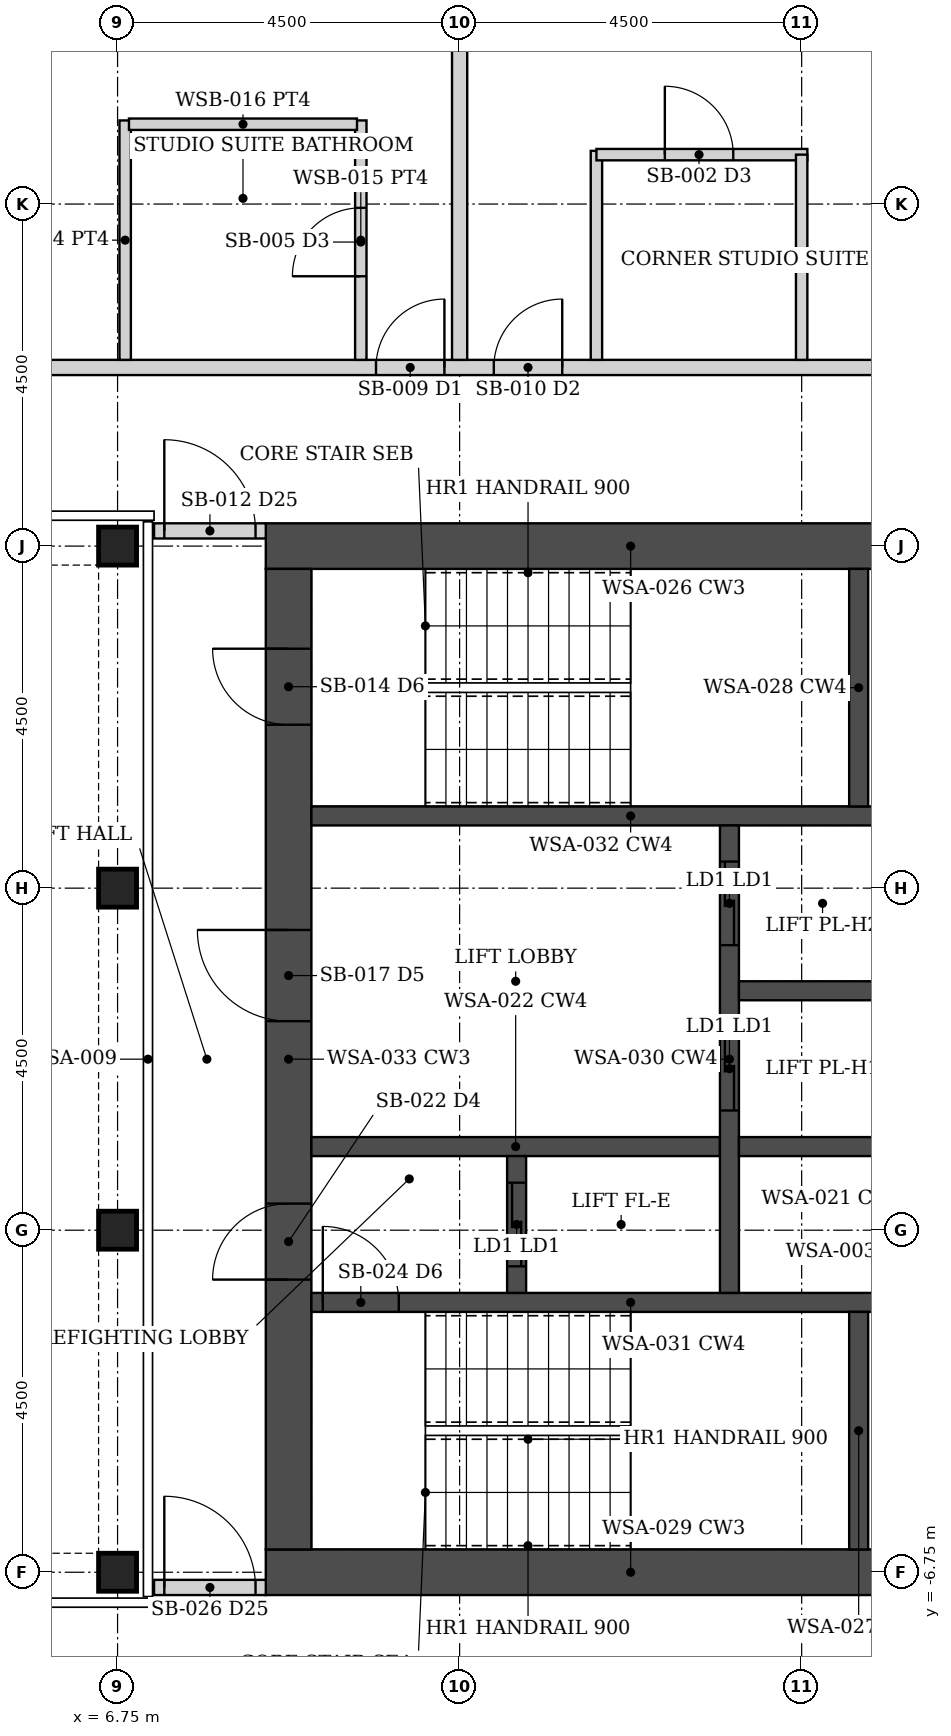
"""IFC4 building model, lengths in metres.
Left out: names, types, materials, properties, quantities, classifications, styles, units other than length and angle.
Written with IfcOpenShell. Run it as: python <this file> out.ifc"""

import sys

from ifc_helpers import new_model, si_unit, direction, frame, frame_2d, origin, origin_2d, place, context, subcontext, project, spatial, rectangle, hollow_rectangle, extrude, element, fill, save


model = new_model("IFC4")
c1 = context("Model", 3, precision=1e-05, world=origin(), true_north=direction((0.0, 1.0)))
c2 = subcontext(c1, "Body", "Model", "MODEL_VIEW")
j1 = project(units=[si_unit("LENGTHUNIT", "METRE"), si_unit("PLANEANGLEUNIT", "RADIAN")], contexts=[c1])
p1 = place(None, origin())
s1 = spatial("IfcSite", under=j1, at=p1, CompositionType="ELEMENT")
p2 = place(p1, origin())
s2 = spatial("IfcBuilding", under=s1, at=p2, CompositionType="ELEMENT")
p3 = place(p2, frame((0.0, 0.0, 212.05)))
s3 = spatial("IfcBuildingStorey", under=s2, at=p3, CompositionType="ELEMENT", Elevation=212.05)
for number, where, z_axis, x_axis in (
    (1, (6.75, -6.75, 0.0), (0.0, 0.0, 1.0), (1.0, 0.0, 0.0)),
    (2, (6.75, -2.25, 0.0), (0.0, 0.0, 1.0), (1.0, 0.0, 0.0)),
    (3, (6.75, 2.25, 0.0), (0.0, 0.0, 1.0), (1.0, 0.0, 0.0)),
    (4, (6.75, 6.75, 0.0), (0.0, 0.0, 1.0), (1.0, 0.0, 0.0)),
):
    element("IfcColumn", number, at=place(p3, frame(where, z_axis=z_axis, x_axis=x_axis)), inside=s3, PredefinedType="COLUMN", context=c2, shape_type="SweptSolid", body=[
        extrude(hollow_rectangle(XDim=0.5, YDim=0.5, WallThickness=0.03, at=origin_2d()), origin(), (0.0, 0.0, 1.0), 3.75),
    ])
for number, where, z_axis, x_axis in (
    (5, (8.7, -6.75, 0.0), (0.0, 0.0, 1.0), (1.0, 0.0, 0.0)),
    (6, (8.7, 6.75, 0.0), (0.0, 0.0, 1.0), (1.0, 0.0, 0.0)),
):
    element("IfcWall", number, at=place(p3, frame(where, z_axis=z_axis, x_axis=x_axis)), inside=s3, PredefinedType="SHEAR", context=c2, shape_type="SweptSolid", body=[
        extrude(rectangle(XDim=9.6, YDim=0.6, at=frame_2d((4.8, 0.0))), origin(), (0.0, 0.0, 1.0), 3.75),
    ])
p4 = place(p3, frame((9.0, -6.45, 0.0), z_axis=(0.0, 0.0, 1.0), x_axis=(0.0, 1.0, 0.0)))
e7 = element("IfcWall", 7, at=p4, inside=s3, PredefinedType="SHEAR", context=c2, shape_type="SweptSolid", body=[
    extrude(rectangle(XDim=12.9, YDim=0.6, at=frame_2d((6.45, 0.0))), origin(), (0.0, 0.0, 1.0), 3.75),
])
p5 = place(p4, frame((3.55, 0.0, 0.0)))
e8 = element("IfcOpeningElement", 8, at=p5, cuts=e7, PredefinedType="OPENING", context=c2, shape_type="SweptSolid", body=[
    extrude(rectangle(XDim=1.0, YDim=2.1, at=frame_2d((0.5, 1.05))), frame((0.0, 0.31, 0.0), z_axis=(0.0, -1.0, 0.0), x_axis=(1.0, 0.0, 0.0)), (0.0, 0.0, 1.0), 0.62),
])
p6 = place(p4, frame((6.95, 0.0, 0.0)))
e9 = element("IfcOpeningElement", 9, at=p6, cuts=e7, PredefinedType="OPENING", context=c2, shape_type="SweptSolid", body=[
    extrude(rectangle(XDim=1.2, YDim=2.1, at=frame_2d((0.6, 1.05))), frame((0.0, 0.31, 0.0), z_axis=(0.0, -1.0, 0.0), x_axis=(1.0, 0.0, 0.0)), (0.0, 0.0, 1.0), 0.62),
])
p7 = place(p4, frame((10.85, 0.0, 0.0)))
e10 = element("IfcOpeningElement", 10, at=p7, cuts=e7, PredefinedType="OPENING", context=c2, shape_type="SweptSolid", body=[
    extrude(rectangle(XDim=1.0, YDim=2.1, at=frame_2d((0.5, 1.05))), frame((0.0, 0.31, 0.0), z_axis=(0.0, -1.0, 0.0), x_axis=(1.0, 0.0, 0.0)), (0.0, 0.0, 1.0), 0.62),
])
p8 = place(p3, frame((9.3, -3.2, 0.0), z_axis=(0.0, 0.0, 1.0), x_axis=(1.0, 0.0, 0.0)))
e11 = element("IfcWall", 11, at=p8, inside=s3, PredefinedType="SHEAR", context=c2, shape_type="SweptSolid", body=[
    extrude(rectangle(XDim=8.4, YDim=0.25, at=frame_2d((4.2, 0.0))), origin(), (0.0, 0.0, 1.0), 3.75),
])
p9 = place(p8, frame((0.15, 0.0, 0.0)))
e12 = element("IfcOpeningElement", 12, at=p9, cuts=e11, PredefinedType="OPENING", context=c2, shape_type="SweptSolid", body=[
    extrude(rectangle(XDim=1.0, YDim=2.1, at=frame_2d((0.5, 1.05))), frame((0.0, 0.135, 0.0), z_axis=(0.0, -1.0, 0.0), x_axis=(1.0, 0.0, 0.0)), (0.0, 0.0, 1.0), 0.27),
])
p10 = place(p3, frame((9.3, 3.2, 0.0), z_axis=(0.0, 0.0, 1.0), x_axis=(1.0, 0.0, 0.0)))
e13 = element("IfcWall", 13, at=p10, inside=s3, PredefinedType="SHEAR", context=c2, shape_type="SweptSolid", body=[
    extrude(rectangle(XDim=8.4, YDim=0.25, at=frame_2d((4.2, 0.0))), origin(), (0.0, 0.0, 1.0), 3.75),
])
for number, where, z_axis, x_axis in (
    (14, (16.5, -6.45, 0.0), (0.0, 0.0, 1.0), (0.0, 1.0, 0.0)),
    (15, (16.5, 3.325, 0.0), (0.0, 0.0, 1.0), (0.0, 1.0, 0.0)),
):
    element("IfcWall", number, at=place(p3, frame(where, z_axis=z_axis, x_axis=x_axis)), inside=s3, PredefinedType="SHEAR", context=c2, shape_type="SweptSolid", body=[
        extrude(rectangle(XDim=3.125, YDim=0.25, at=frame_2d((1.562, 0.0))), origin(), (0.0, 0.0, 1.0), 3.75),
    ])
p11 = place(p3, frame((9.3, -1.15, 0.0), z_axis=(0.0, 0.0, 1.0), x_axis=(1.0, 0.0, 0.0)))
e16 = element("IfcWall", 16, at=p11, inside=s3, PredefinedType="SHEAR", context=c2, shape_type="SweptSolid", body=[
    extrude(rectangle(XDim=5.375, YDim=0.25, at=frame_2d((2.688, 0.0))), origin(), (0.0, 0.0, 1.0), 3.75),
])
p12 = place(p3, frame((12.0, -3.075, 0.0), z_axis=(0.0, 0.0, 1.0), x_axis=(0.0, 1.0, 0.0)))
e17 = element("IfcWall", 17, at=p12, inside=s3, PredefinedType="SHEAR", context=c2, shape_type="SweptSolid", body=[
    extrude(rectangle(XDim=1.8, YDim=0.25, at=frame_2d((0.9, 0.0))), origin(), (0.0, 0.0, 1.0), 3.75),
])
p13 = place(p12, frame((0.35, 0.0, 0.0)))
e18 = element("IfcOpeningElement", 18, at=p13, cuts=e17, PredefinedType="OPENING", context=c2, shape_type="SweptSolid", body=[
    extrude(rectangle(XDim=1.1, YDim=2.1, at=frame_2d((0.55, 1.05))), frame((0.0, 0.135, 0.0), z_axis=(0.0, -1.0, 0.0), x_axis=(1.0, 0.0, 0.0)), (0.0, 0.0, 1.0), 0.27),
])
p14 = place(p3, frame((14.8, -3.075, 0.0), z_axis=(0.0, 0.0, 1.0), x_axis=(0.0, 1.0, 0.0)))
e19 = element("IfcWall", 19, at=p14, inside=s3, PredefinedType="SHEAR", context=c2, shape_type="SweptSolid", body=[
    extrude(rectangle(XDim=6.15, YDim=0.25, at=frame_2d((3.075, 0.0))), origin(), (0.0, 0.0, 1.0), 3.75),
])
p15 = place(p14, frame((2.4, 0.0, 0.0)))
e20 = element("IfcOpeningElement", 20, at=p15, cuts=e19, PredefinedType="OPENING", context=c2, shape_type="SweptSolid", body=[
    extrude(rectangle(XDim=1.1, YDim=2.1, at=frame_2d((0.55, 1.05))), frame((0.0, 0.135, 0.0), z_axis=(0.0, -1.0, 0.0), x_axis=(1.0, 0.0, 0.0)), (0.0, 0.0, 1.0), 0.27),
])
p16 = place(p14, frame((4.575, 0.0, 0.0)))
e21 = element("IfcOpeningElement", 21, at=p16, cuts=e19, PredefinedType="OPENING", context=c2, shape_type="SweptSolid", body=[
    extrude(rectangle(XDim=1.1, YDim=2.1, at=frame_2d((0.55, 1.05))), frame((0.0, 0.135, 0.0), z_axis=(0.0, -1.0, 0.0), x_axis=(1.0, 0.0, 0.0)), (0.0, 0.0, 1.0), 0.27),
])
for number, where, z_axis, x_axis in (
    (22, (14.925, -1.15, 0.0), (0.0, 0.0, 1.0), (1.0, 0.0, 0.0)),
    (23, (14.925, 0.9, 0.0), (0.0, 0.0, 1.0), (1.0, 0.0, 0.0)),
):
    element("IfcWall", number, at=place(p3, frame(where, z_axis=z_axis, x_axis=x_axis)), inside=s3, PredefinedType="SHEAR", context=c2, shape_type="SweptSolid", body=[
        extrude(rectangle(XDim=2.775, YDim=0.25, at=frame_2d((1.387, 0.0))), origin(), (0.0, 0.0, 1.0), 3.75),
    ])
p17 = place(p3, frame((7.23, 6.95, 0.0), z_axis=(0.0, 0.0, 1.0), x_axis=(1.0, 0.0, 0.0)))
e24 = element("IfcWall", 24, at=p17, inside=s3, PredefinedType="PARTITIONING", context=c2, shape_type="SweptSolid", body=[
    extrude(rectangle(XDim=1.47, YDim=0.2, at=frame_2d((0.735, 0.0))), origin(), (0.0, 0.0, 1.0), 2.629),
])
p18 = place(p17, frame((0.135, 0.0, 0.0)))
e25 = element("IfcOpeningElement", 25, at=p18, cuts=e24, PredefinedType="OPENING", context=c2, shape_type="SweptSolid", body=[
    extrude(rectangle(XDim=1.2, YDim=2.1, at=frame_2d((0.6, 1.05))), frame((0.0, 0.11, 0.0), z_axis=(0.0, -1.0, 0.0), x_axis=(1.0, 0.0, 0.0)), (0.0, 0.0, 1.0), 0.22),
])
p19 = place(p3, frame((7.23, -6.95, 0.0), z_axis=(0.0, 0.0, 1.0), x_axis=(1.0, 0.0, 0.0)))
e26 = element("IfcWall", 26, at=p19, inside=s3, PredefinedType="PARTITIONING", context=c2, shape_type="SweptSolid", body=[
    extrude(rectangle(XDim=1.47, YDim=0.2, at=frame_2d((0.735, 0.0))), origin(), (0.0, 0.0, 1.0), 2.629),
])
p20 = place(p19, frame((0.135, 0.0, 0.0)))
e27 = element("IfcOpeningElement", 27, at=p20, cuts=e26, PredefinedType="OPENING", context=c2, shape_type="SweptSolid", body=[
    extrude(rectangle(XDim=1.2, YDim=2.1, at=frame_2d((0.6, 1.05))), frame((0.0, 0.11, 0.0), z_axis=(0.0, -1.0, 0.0), x_axis=(1.0, 0.0, 0.0)), (0.0, 0.0, 1.0), 0.22),
])
p21 = place(p3, frame((-20.05, 9.1, 0.0), z_axis=(0.0, 0.0, 1.0), x_axis=(1.0, 0.0, 0.0)))
e28 = element("IfcWall", 28, at=p21, inside=s3, PredefinedType="PARTITIONING", context=c2, shape_type="SweptSolid", body=[
    extrude(rectangle(XDim=40.1, YDim=0.2, at=frame_2d((20.05, 0.0))), origin(), (0.0, 0.0, 1.0), 2.629),
])
p22 = place(p21, frame((9.0, 0.0, 0.0)))
e29 = element("IfcOpeningElement", 29, at=p22, cuts=e28, PredefinedType="OPENING", context=c2, shape_type="SweptSolid", body=[
    extrude(rectangle(XDim=0.9, YDim=2.1, at=frame_2d((0.45, 1.05))), frame((0.0, 0.11, 0.0), z_axis=(0.0, -1.0, 0.0), x_axis=(1.0, 0.0, 0.0)), (0.0, 0.0, 1.0), 0.22),
])
p23 = place(p21, frame((18.0, 0.0, 0.0)))
e30 = element("IfcOpeningElement", 30, at=p23, cuts=e28, PredefinedType="OPENING", context=c2, shape_type="SweptSolid", body=[
    extrude(rectangle(XDim=0.9, YDim=2.1, at=frame_2d((0.45, 1.05))), frame((0.0, 0.11, 0.0), z_axis=(0.0, -1.0, 0.0), x_axis=(1.0, 0.0, 0.0)), (0.0, 0.0, 1.0), 0.22),
])
p24 = place(p21, frame((30.2, 0.0, 0.0)))
e31 = element("IfcOpeningElement", 31, at=p24, cuts=e28, PredefinedType="OPENING", context=c2, shape_type="SweptSolid", body=[
    extrude(rectangle(XDim=0.9, YDim=2.1, at=frame_2d((0.45, 1.05))), frame((0.0, 0.11, 0.0), z_axis=(0.0, -1.0, 0.0), x_axis=(1.0, 0.0, 0.0)), (0.0, 0.0, 1.0), 0.22),
])
p25 = place(p21, frame((31.75, 0.0, 0.0)))
e32 = element("IfcOpeningElement", 32, at=p25, cuts=e28, PredefinedType="OPENING", context=c2, shape_type="SweptSolid", body=[
    extrude(rectangle(XDim=0.9, YDim=2.1, at=frame_2d((0.45, 1.05))), frame((0.0, 0.11, 0.0), z_axis=(0.0, -1.0, 0.0), x_axis=(1.0, 0.0, 0.0)), (0.0, 0.0, 1.0), 0.22),
])
p26 = place(p21, frame((7.45, 0.0, 0.0)))
e33 = element("IfcOpeningElement", 33, at=p26, cuts=e28, PredefinedType="OPENING", context=c2, shape_type="SweptSolid", body=[
    extrude(rectangle(XDim=0.9, YDim=2.1, at=frame_2d((0.45, 1.05))), frame((0.0, 0.11, 0.0), z_axis=(0.0, -1.0, 0.0), x_axis=(1.0, 0.0, 0.0)), (0.0, 0.0, 1.0), 0.22),
])
p27 = place(p3, frame((9.95, 9.2, 0.0), z_axis=(0.0, 0.0, 1.0), x_axis=(0.0, 1.0, 0.0)))
e34 = element("IfcWall", 34, at=p27, inside=s3, PredefinedType="PARTITIONING", context=c2, shape_type="SweptSolid", body=[
    extrude(rectangle(XDim=3.15, YDim=0.15, at=frame_2d((1.575, 0.0))), origin(), (0.0, 0.0, 1.0), 2.629),
])
p28 = place(p27, frame((1.1, 0.0, 0.0)))
e35 = element("IfcOpeningElement", 35, at=p28, cuts=e34, PredefinedType="OPENING", context=c2, shape_type="SweptSolid", body=[
    extrude(rectangle(XDim=0.9, YDim=2.1, at=frame_2d((0.45, 1.05))), frame((0.0, 0.085, 0.0), z_axis=(0.0, -1.0, 0.0), x_axis=(1.0, 0.0, 0.0)), (0.0, 0.0, 1.0), 0.17),
])
p29 = place(p3, frame((6.85, 9.2, 0.0), z_axis=(0.0, 0.0, 1.0), x_axis=(0.0, 1.0, 0.0)))
e36 = element("IfcWall", 36, at=p29, inside=s3, PredefinedType="PARTITIONING", context=c2, shape_type="SweptSolid", body=[
    extrude(rectangle(XDim=3.15, YDim=0.15, at=frame_2d((1.575, 0.0))), origin(), (0.0, 0.0, 1.0), 2.629),
])
p30 = place(p3, frame((6.9, 12.3, 0.0), z_axis=(0.0, 0.0, 1.0), x_axis=(1.0, 0.0, 0.0)))
e37 = element("IfcWall", 37, at=p30, inside=s3, PredefinedType="PARTITIONING", context=c2, shape_type="SweptSolid", body=[
    extrude(rectangle(XDim=3.0, YDim=0.15, at=frame_2d((1.5, 0.0))), origin(), (0.0, 0.0, 1.0), 2.629),
])
p31 = place(p3, frame((11.25, 9.2, 0.0), z_axis=(0.0, 0.0, 1.0), x_axis=(0.0, 1.0, 0.0)))
e38 = element("IfcWall", 38, at=p31, inside=s3, PredefinedType="PARTITIONING", context=c2, shape_type="SweptSolid", body=[
    extrude(rectangle(XDim=10.7, YDim=0.2, at=frame_2d((5.35, 0.0))), origin(), (0.0, 0.0, 1.0), 2.629),
])
p32 = place(p3, frame((13.05, 9.2, 0.0), z_axis=(0.0, 0.0, 1.0), x_axis=(0.0, 1.0, 0.0)))
e39 = element("IfcWall", 39, at=p32, inside=s3, PredefinedType="PARTITIONING", context=c2, shape_type="SweptSolid", body=[
    extrude(rectangle(XDim=2.75, YDim=0.15, at=frame_2d((1.375, 0.0))), origin(), (0.0, 0.0, 1.0), 2.629),
])
p33 = place(p3, frame((13.05, 11.9, 0.0), z_axis=(0.0, 0.0, 1.0), x_axis=(1.0, 0.0, 0.0)))
e40 = element("IfcWall", 40, at=p33, inside=s3, PredefinedType="PARTITIONING", context=c2, shape_type="SweptSolid", body=[
    extrude(rectangle(XDim=2.775, YDim=0.15, at=frame_2d((1.387, 0.0))), origin(), (0.0, 0.0, 1.0), 2.629),
])
p34 = place(p33, frame((0.9, 0.0, 0.0)))
e41 = element("IfcOpeningElement", 41, at=p34, cuts=e40, PredefinedType="OPENING", context=c2, shape_type="SweptSolid", body=[
    extrude(rectangle(XDim=0.9, YDim=2.1, at=frame_2d((0.45, 1.05))), frame((0.0, 0.085, 0.0), z_axis=(0.0, -1.0, 0.0), x_axis=(1.0, 0.0, 0.0)), (0.0, 0.0, 1.0), 0.17),
])
p35 = place(p3, frame((15.75, 9.2, 0.0), z_axis=(0.0, 0.0, 1.0), x_axis=(0.0, 1.0, 0.0)))
e42 = element("IfcWall", 42, at=p35, inside=s3, PredefinedType="PARTITIONING", context=c2, shape_type="SweptSolid", body=[
    extrude(rectangle(XDim=2.7, YDim=0.15, at=frame_2d((1.35, 0.0))), origin(), (0.0, 0.0, 1.0), 2.629),
])
p36 = place(p18, origin())
e43 = element("IfcDoor", 43, at=p36, inside=s3, OperationType="DOUBLE_DOOR_DOUBLE_SWING", PredefinedType="DOOR", context=c2, shape_type="SweptSolid", body=[
    extrude(rectangle(XDim=1.2, YDim=2.1, at=frame_2d((0.6, 1.05))), frame((0.0, 0.025, 0.0), z_axis=(0.0, -1.0, 0.0), x_axis=(1.0, 0.0, 0.0)), (0.0, 0.0, 1.0), 0.05),
])
fill(e25, e43)
p37 = place(p20, origin())
e44 = element("IfcDoor", 44, at=p37, inside=s3, OperationType="DOUBLE_DOOR_DOUBLE_SWING", PredefinedType="DOOR", context=c2, shape_type="SweptSolid", body=[
    extrude(rectangle(XDim=1.2, YDim=2.1, at=frame_2d((0.6, 1.05))), frame((0.0, 0.025, 0.0), z_axis=(0.0, -1.0, 0.0), x_axis=(1.0, 0.0, 0.0)), (0.0, 0.0, 1.0), 0.05),
])
fill(e27, e44)
p38 = place(p24, origin())
e45 = element("IfcDoor", 45, at=p38, inside=s3, OperationType="SINGLE_SWING_RIGHT", PredefinedType="DOOR", context=c2, shape_type="SweptSolid", body=[
    extrude(rectangle(XDim=0.9, YDim=2.1, at=frame_2d((0.45, 1.05))), frame((0.0, 0.025, 0.0), z_axis=(0.0, -1.0, 0.0), x_axis=(1.0, 0.0, 0.0)), (0.0, 0.0, 1.0), 0.05),
])
fill(e31, e45)
p39 = place(p28, origin())
e46 = element("IfcDoor", 46, at=p39, inside=s3, OperationType="SINGLE_SWING_LEFT", PredefinedType="DOOR", context=c2, shape_type="SweptSolid", body=[
    extrude(rectangle(XDim=0.9, YDim=2.1, at=frame_2d((0.45, 1.05))), frame((0.0, 0.025, 0.0), z_axis=(0.0, -1.0, 0.0), x_axis=(1.0, 0.0, 0.0)), (0.0, 0.0, 1.0), 0.05),
])
fill(e35, e46)
p40 = place(p25, origin())
e47 = element("IfcDoor", 47, at=p40, inside=s3, OperationType="SINGLE_SWING_RIGHT", PredefinedType="DOOR", context=c2, shape_type="SweptSolid", body=[
    extrude(rectangle(XDim=0.9, YDim=2.1, at=frame_2d((0.45, 1.05))), frame((0.0, 0.025, 0.0), z_axis=(0.0, -1.0, 0.0), x_axis=(1.0, 0.0, 0.0)), (0.0, 0.0, 1.0), 0.05),
])
fill(e32, e47)
p41 = place(p34, origin())
e48 = element("IfcDoor", 48, at=p41, inside=s3, OperationType="SINGLE_SWING_LEFT", PredefinedType="DOOR", context=c2, shape_type="SweptSolid", body=[
    extrude(rectangle(XDim=0.9, YDim=2.1, at=frame_2d((0.45, 1.05))), frame((0.0, 0.025, 0.0), z_axis=(0.0, -1.0, 0.0), x_axis=(1.0, 0.0, 0.0)), (0.0, 0.0, 1.0), 0.05),
])
fill(e41, e48)
p42 = place(p5, origin())
e49 = element("IfcDoor", 49, at=p42, inside=s3, OperationType="SINGLE_SWING_LEFT", PredefinedType="DOOR", context=c2, shape_type="SweptSolid", body=[
    extrude(rectangle(XDim=1.0, YDim=2.1, at=frame_2d((0.5, 1.05))), frame((0.0, 0.025, 0.0), z_axis=(0.0, -1.0, 0.0), x_axis=(1.0, 0.0, 0.0)), (0.0, 0.0, 1.0), 0.05),
])
fill(e8, e49)
p43 = place(p9, origin())
e50 = element("IfcDoor", 50, at=p43, inside=s3, OperationType="SINGLE_SWING_LEFT", PredefinedType="DOOR", context=c2, shape_type="SweptSolid", body=[
    extrude(rectangle(XDim=1.0, YDim=2.1, at=frame_2d((0.5, 1.05))), frame((0.0, 0.025, 0.0), z_axis=(0.0, -1.0, 0.0), x_axis=(1.0, 0.0, 0.0)), (0.0, 0.0, 1.0), 0.05),
])
fill(e12, e50)
p44 = place(p6, origin())
e51 = element("IfcDoor", 51, at=p44, inside=s3, OperationType="SINGLE_SWING_RIGHT", PredefinedType="DOOR", context=c2, shape_type="SweptSolid", body=[
    extrude(rectangle(XDim=1.2, YDim=2.1, at=frame_2d((0.6, 1.05))), frame((0.0, 0.025, 0.0), z_axis=(0.0, -1.0, 0.0), x_axis=(1.0, 0.0, 0.0)), (0.0, 0.0, 1.0), 0.05),
])
fill(e9, e51)
p45 = place(p7, origin())
e52 = element("IfcDoor", 52, at=p45, inside=s3, OperationType="SINGLE_SWING_RIGHT", PredefinedType="DOOR", context=c2, shape_type="SweptSolid", body=[
    extrude(rectangle(XDim=1.0, YDim=2.1, at=frame_2d((0.5, 1.05))), frame((0.0, 0.025, 0.0), z_axis=(0.0, -1.0, 0.0), x_axis=(1.0, 0.0, 0.0)), (0.0, 0.0, 1.0), 0.05),
])
fill(e10, e52)
p46 = place(p13, origin())
e53 = element("IfcDoor", 53, at=p46, inside=s3, OperationType="DOUBLE_DOOR_SLIDING", PredefinedType="DOOR", context=c2, shape_type="SweptSolid", body=[
    extrude(rectangle(XDim=1.1, YDim=2.1, at=frame_2d((0.55, 1.05))), frame((0.0, 0.025, 0.0), z_axis=(0.0, -1.0, 0.0), x_axis=(1.0, 0.0, 0.0)), (0.0, 0.0, 1.0), 0.05),
])
fill(e18, e53)
p47 = place(p15, origin())
e54 = element("IfcDoor", 54, at=p47, inside=s3, OperationType="DOUBLE_DOOR_SLIDING", PredefinedType="DOOR", context=c2, shape_type="SweptSolid", body=[
    extrude(rectangle(XDim=1.1, YDim=2.1, at=frame_2d((0.55, 1.05))), frame((0.0, 0.025, 0.0), z_axis=(0.0, -1.0, 0.0), x_axis=(1.0, 0.0, 0.0)), (0.0, 0.0, 1.0), 0.05),
])
fill(e20, e54)
p48 = place(p16, origin())
e55 = element("IfcDoor", 55, at=p48, inside=s3, OperationType="DOUBLE_DOOR_SLIDING", PredefinedType="DOOR", context=c2, shape_type="SweptSolid", body=[
    extrude(rectangle(XDim=1.1, YDim=2.1, at=frame_2d((0.55, 1.05))), frame((0.0, 0.025, 0.0), z_axis=(0.0, -1.0, 0.0), x_axis=(1.0, 0.0, 0.0)), (0.0, 0.0, 1.0), 0.05),
])
fill(e21, e55)
save(model, sys.argv[1])
